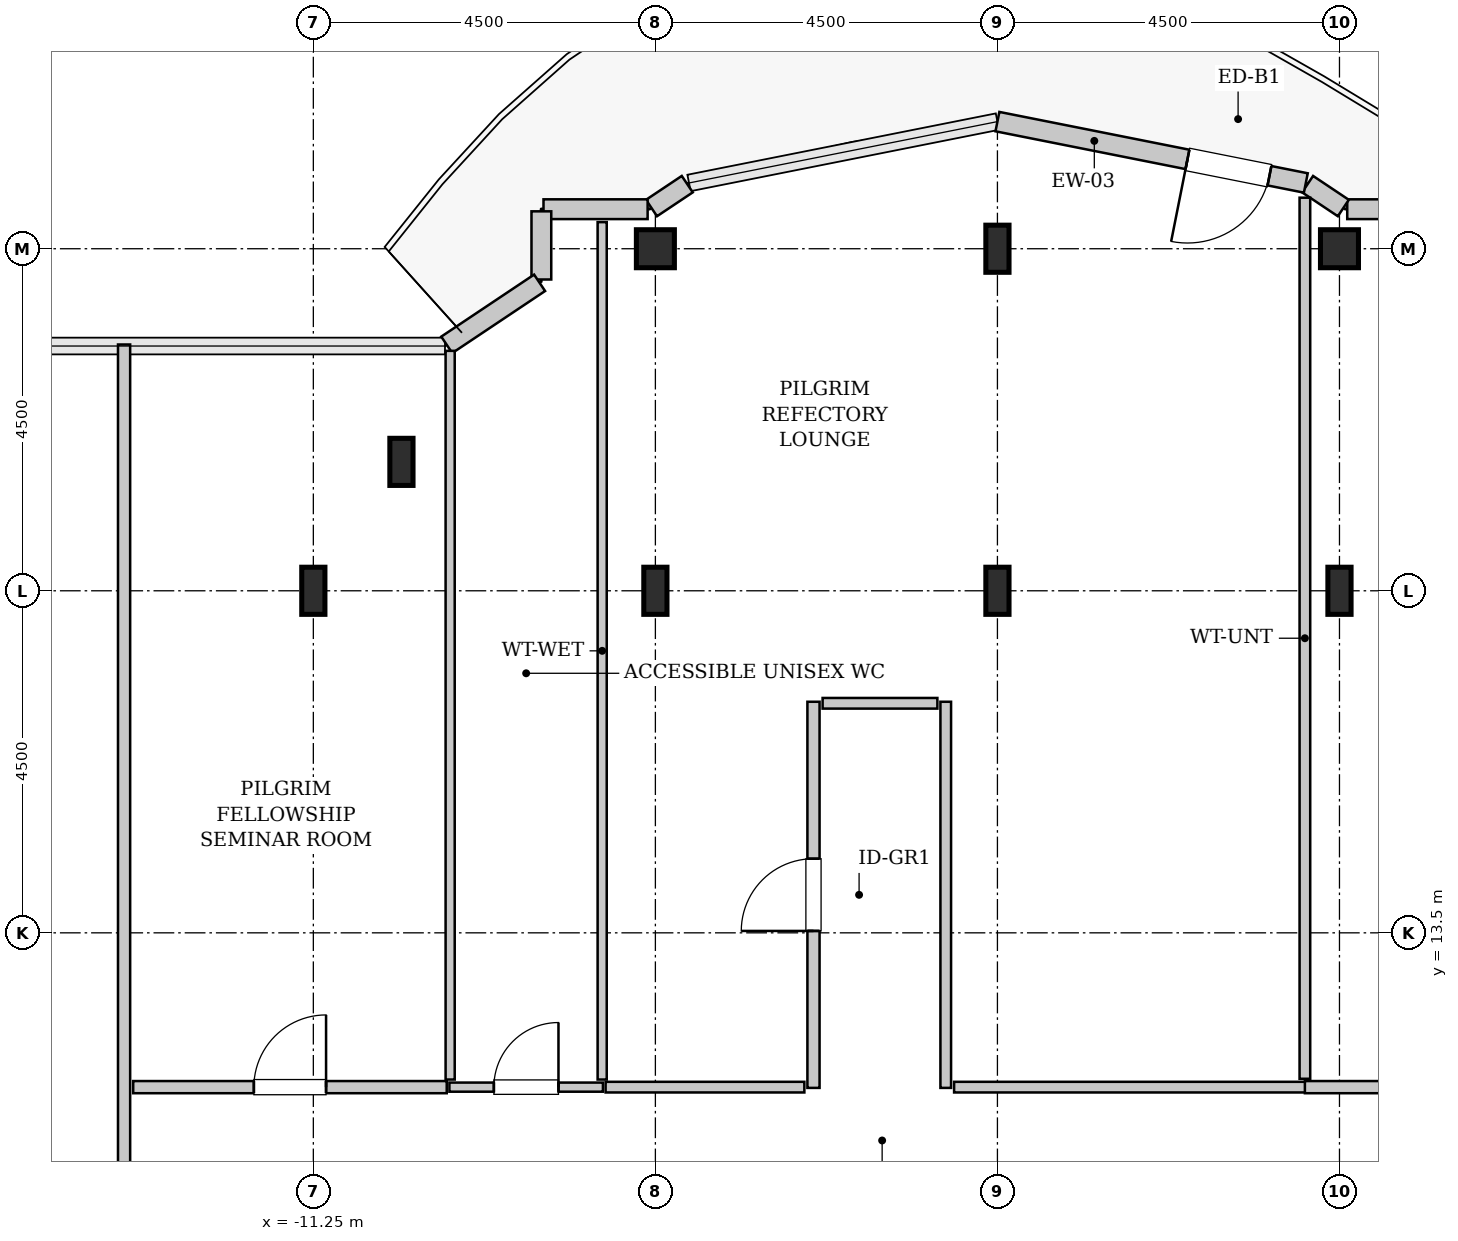
"""IFC4 building model, lengths in metres.
Left out: names, types, materials, properties, quantities, classifications, styles, units other than length and angle.
Written with IfcOpenShell. Run it as: python <this file> out.ifc"""

import sys

from ifc_helpers import new_model, si_unit, direction, frame, frame_2d, origin, origin_2d, place, context, subcontext, project, spatial, rectangle, hollow_rectangle, i_section, extrude, source, transform, mapped, element, fill, save


model = new_model("IFC4")
c1 = context("Model", 3, precision=1e-05, world=origin(), true_north=direction((0.0, 1.0)))
c2 = subcontext(c1, "Body", "Model", "MODEL_VIEW")
j1 = project(units=[si_unit("LENGTHUNIT", "METRE"), si_unit("PLANEANGLEUNIT", "RADIAN")], contexts=[c1])
p1 = place(None, origin())
s1 = spatial("IfcSite", under=j1, at=p1, CompositionType="ELEMENT")
p2 = place(p1, origin())
s2 = spatial("IfcBuilding", under=s1, at=p2, CompositionType="ELEMENT")
p3 = place(p2, frame((0.0, 0.0, 322.4)))
s3 = spatial("IfcBuildingStorey", under=s2, at=p3, CompositionType="ELEMENT", Elevation=322.4)
m1 = source(origin(), c2, "Body", "SweptSolid", [
    extrude(i_section(OverallWidth=0.305, OverallDepth=0.62, WebThickness=0.021, FlangeThickness=0.04, FilletRadius=0.027, at=origin_2d()), origin(), (0.0, 0.0, 1.0), 3.8),
])
for number, where, z_axis, x_axis in (
    (1, (-11.25, 18.0, 0.0), (0.0, 0.0, 1.0), (1.0, 0.0, 0.0)),
    (2, (-10.091, 19.696, 0.0), (0.0, 0.0, 1.0), (1.0, 0.0, 0.0)),
    (3, (-6.75, 18.0, 0.0), (0.0, 0.0, 1.0), (1.0, 0.0, 0.0)),
):
    element("IfcColumn", number, at=place(p3, frame(where, z_axis=z_axis, x_axis=x_axis)), inside=s3, PredefinedType="COLUMN", context=c2, shape_type="MappedRepresentation", body=[
        mapped(m1, transform((0.0, 0.0, 0.0), x_axis=(1.0, 0.0, 0.0), y_axis=(0.0, 1.0, 0.0), z_axis=(0.0, 0.0, 1.0), scale=1.0)),
    ])
m2 = source(origin(), c2, "Body", "SweptSolid", [
    extrude(hollow_rectangle(XDim=0.5, YDim=0.5, WallThickness=0.025, InnerFilletRadius=0.025, OuterFilletRadius=0.05, at=origin_2d()), origin(), (0.0, 0.0, 1.0), 3.8),
])
p4 = place(p3, frame((-6.75, 22.5, 0.0), z_axis=(0.0, 0.0, 1.0), x_axis=(1.0, 0.0, 0.0)))
e4 = element("IfcColumn", 4, at=p4, inside=s3, PredefinedType="COLUMN", context=c2, shape_type="MappedRepresentation", body=[
    mapped(m2, transform((0.0, 0.0, 0.0), x_axis=(1.0, 0.0, 0.0), y_axis=(0.0, 1.0, 0.0), z_axis=(0.0, 0.0, 1.0), scale=1.0)),
])
for number, where, z_axis, x_axis in (
    (5, (-2.25, 18.0, 0.0), (0.0, 0.0, 1.0), (1.0, 0.0, 0.0)),
    (6, (-2.25, 22.5, 0.0), (0.0, 0.0, 1.0), (1.0, 0.0, 0.0)),
    (7, (2.25, 18.0, 0.0), (0.0, 0.0, 1.0), (1.0, 0.0, 0.0)),
):
    element("IfcColumn", number, at=place(p3, frame(where, z_axis=z_axis, x_axis=x_axis)), inside=s3, PredefinedType="COLUMN", context=c2, shape_type="MappedRepresentation", body=[
        mapped(m1, transform((0.0, 0.0, 0.0), x_axis=(1.0, 0.0, 0.0), y_axis=(0.0, 1.0, 0.0), z_axis=(0.0, 0.0, 1.0), scale=1.0)),
    ])
p5 = place(p3, frame((2.25, 22.5, 0.0), z_axis=(0.0, 0.0, 1.0), x_axis=(1.0, 0.0, 0.0)))
e8 = element("IfcColumn", 8, at=p5, inside=s3, PredefinedType="COLUMN", context=c2, shape_type="MappedRepresentation", body=[
    mapped(m2, transform((0.0, 0.0, 0.0), x_axis=(1.0, 0.0, 0.0), y_axis=(0.0, 1.0, 0.0), z_axis=(0.0, 0.0, 1.0), scale=1.0)),
])
m3 = source(origin(), c2, "Body", "SweptSolid", [
    extrude(rectangle(XDim=1.37, YDim=0.26, at=frame_2d((0.685, 0.0))), origin(), (0.0, 0.0, 1.0), 3.55),
])
p6 = place(p3, frame((3.722, 23.02, 0.0), z_axis=(0.0, 0.0, 1.0), x_axis=(-1.0, 0.0, 0.0)))
e9 = element("IfcWall", 9, at=p6, inside=s3, PredefinedType="SOLIDWALL", context=c2, shape_type="MappedRepresentation", body=[
    mapped(m3, transform((0.0, 0.0, 0.0), x_axis=(1.0, 0.0, 0.0), y_axis=(0.0, 1.0, 0.0), z_axis=(0.0, 0.0, 1.0), scale=1.0)),
])
m4 = source(origin(), c2, "Body", "SweptSolid", [
    extrude(rectangle(XDim=0.565, YDim=0.26, at=frame_2d((0.283, 0.0))), origin(), (0.0, 0.0, 1.0), 3.55),
])
p7 = place(p3, frame((2.301, 23.036, 0.0), z_axis=(0.0, 0.0, 1.0), x_axis=(-0.831651492666, 0.555297933317, 0.0)))
e10 = element("IfcWall", 10, at=p7, inside=s3, PredefinedType="SOLIDWALL", context=c2, shape_type="MappedRepresentation", body=[
    mapped(m4, transform((0.0, 0.0, 0.0), x_axis=(1.0, 0.0, 0.0), y_axis=(0.0, 1.0, 0.0), z_axis=(0.0, 0.0, 1.0), scale=1.0)),
])
m5 = source(origin(), c2, "Body", "SweptSolid", [
    extrude(rectangle(XDim=4.137, YDim=0.26, at=frame_2d((2.068, 0.0))), origin(), (0.0, 0.0, 1.0), 3.55),
])
p8 = place(p3, frame((1.807, 23.365, 0.0), z_axis=(0.0, 0.0, 1.0), x_axis=(-0.980782170794, 0.195105954428, 0.0)))
e11 = element("IfcWall", 11, at=p8, inside=s3, PredefinedType="SOLIDWALL", context=c2, shape_type="MappedRepresentation", body=[
    mapped(m5, transform((0.0, 0.0, 0.0), x_axis=(1.0, 0.0, 0.0), y_axis=(0.0, 1.0, 0.0), z_axis=(0.0, 0.0, 1.0), scale=1.0)),
])
p9 = place(p8, frame((0.488, 0.0, 0.0)))
e12 = element("IfcOpeningElement", 12, at=p9, cuts=e11, PredefinedType="OPENING", context=c2, shape_type="SweptSolid", body=[
    extrude(rectangle(XDim=1.1, YDim=2.2, at=frame_2d((0.55, 1.1))), frame((0.0, 0.14, 0.0), z_axis=(0.0, -1.0, 0.0), x_axis=(1.0, 0.0, 0.0)), (0.0, 0.0, 1.0), 0.28),
])
p10 = place(p3, frame((-6.331, 23.35, 0.0), z_axis=(0.0, 0.0, 1.0), x_axis=(-0.831651492666, -0.555297933317, 0.0)))
e13 = element("IfcWall", 13, at=p10, inside=s3, PredefinedType="SOLIDWALL", context=c2, shape_type="MappedRepresentation", body=[
    mapped(m4, transform((0.0, 0.0, 0.0), x_axis=(1.0, 0.0, 0.0), y_axis=(0.0, 1.0, 0.0), z_axis=(0.0, 0.0, 1.0), scale=1.0)),
])
p11 = place(p3, frame((-6.852, 23.02, 0.0), z_axis=(0.0, 0.0, 1.0), x_axis=(-1.0, 0.0, 0.0)))
e14 = element("IfcWall", 14, at=p11, inside=s3, PredefinedType="SOLIDWALL", context=c2, shape_type="MappedRepresentation", body=[
    mapped(m3, transform((0.0, 0.0, 0.0), x_axis=(1.0, 0.0, 0.0), y_axis=(0.0, 1.0, 0.0), z_axis=(0.0, 0.0, 1.0), scale=1.0)),
])
m6 = source(origin(), c2, "Body", "SweptSolid", [
    extrude(rectangle(XDim=0.897, YDim=0.26, at=frame_2d((0.448, 0.0))), origin(), (0.0, 0.0, 1.0), 3.55),
])
p12 = place(p3, frame((-8.25, 22.992, 0.0), z_axis=(0.0, 0.0, 1.0), x_axis=(0.0, -1.0, 0.0)))
e15 = element("IfcWall", 15, at=p12, inside=s3, PredefinedType="SOLIDWALL", context=c2, shape_type="MappedRepresentation", body=[
    mapped(m6, transform((0.0, 0.0, 0.0), x_axis=(1.0, 0.0, 0.0), y_axis=(0.0, 1.0, 0.0), z_axis=(0.0, 0.0, 1.0), scale=1.0)),
])
m7 = source(origin(), c2, "Body", "SweptSolid", [
    extrude(rectangle(XDim=1.469, YDim=0.26, at=frame_2d((0.734, 0.0))), origin(), (0.0, 0.0, 1.0), 3.55),
])
p13 = place(p3, frame((-8.273, 22.052, 0.0), z_axis=(0.0, 0.0, 1.0), x_axis=(-0.831461760506, -0.555581983884, 0.0)))
e16 = element("IfcWall", 16, at=p13, inside=s3, PredefinedType="SOLIDWALL", context=c2, shape_type="MappedRepresentation", body=[
    mapped(m7, transform((0.0, 0.0, 0.0), x_axis=(1.0, 0.0, 0.0), y_axis=(0.0, 1.0, 0.0), z_axis=(0.0, 0.0, 1.0), scale=1.0)),
])
m8 = source(origin(), c2, "Body", "SweptSolid", [
    extrude(rectangle(XDim=2.02, YDim=0.12, at=frame_2d((1.01, 0.0))), origin(), (0.0, 0.0, 1.0), 3.535),
])
p14 = place(p3, frame((-9.46, 11.47, 0.0), z_axis=(0.0, 0.0, 1.0), x_axis=(1.0, 0.0, 0.0)))
e17 = element("IfcWall", 17, at=p14, inside=s3, PredefinedType="PLUMBINGWALL", context=c2, shape_type="MappedRepresentation", body=[
    mapped(m8, transform((0.0, 0.0, 0.0), x_axis=(1.0, 0.0, 0.0), y_axis=(0.0, 1.0, 0.0), z_axis=(0.0, 0.0, 1.0), scale=1.0)),
])
p15 = place(p14, frame((0.585, 0.0, 0.0)))
e18 = element("IfcOpeningElement", 18, at=p15, cuts=e17, PredefinedType="OPENING", context=c2, shape_type="SweptSolid", body=[
    extrude(rectangle(XDim=0.85, YDim=2.1, at=frame_2d((0.425, 1.05))), frame((0.0, 0.07, 0.0), z_axis=(0.0, -1.0, 0.0), x_axis=(1.0, 0.0, 0.0)), (0.0, 0.0, 1.0), 0.14),
])
m9 = source(origin(), c2, "Body", "SweptSolid", [
    extrude(rectangle(XDim=11.28, YDim=0.12, at=frame_2d((5.64, 0.0))), origin(), (0.0, 0.0, 1.0), 3.535),
])
p16 = place(p3, frame((-7.45, 11.57, 0.0), z_axis=(0.0, 0.0, 1.0), x_axis=(0.0, 1.0, 0.0)))
e19 = element("IfcWall", 19, at=p16, inside=s3, PredefinedType="PLUMBINGWALL", context=c2, shape_type="MappedRepresentation", body=[
    mapped(m9, transform((0.0, 0.0, 0.0), x_axis=(1.0, 0.0, 0.0), y_axis=(0.0, 1.0, 0.0), z_axis=(0.0, 0.0, 1.0), scale=1.0)),
])
m10 = source(origin(), c2, "Body", "SweptSolid", [
    extrude(rectangle(XDim=9.587, YDim=0.12, at=frame_2d((4.793, 0.0))), origin(), (0.0, 0.0, 1.0), 3.535),
])
p17 = place(p3, frame((-9.45, 11.57, 0.0), z_axis=(0.0, 0.0, 1.0), x_axis=(0.0, 1.0, 0.0)))
e20 = element("IfcWall", 20, at=p17, inside=s3, PredefinedType="PLUMBINGWALL", context=c2, shape_type="MappedRepresentation", body=[
    mapped(m10, transform((0.0, 0.0, 0.0), x_axis=(1.0, 0.0, 0.0), y_axis=(0.0, 1.0, 0.0), z_axis=(0.0, 0.0, 1.0), scale=1.0)),
])
m11 = source(origin(), c2, "Body", "SweptSolid", [
    extrude(rectangle(XDim=15.045, YDim=0.16, at=frame_2d((7.522, 0.0))), origin(), (0.0, 0.0, 1.0), 3.535),
])
p18 = place(p3, frame((-13.74, 6.195, 0.0), z_axis=(0.0, 0.0, 1.0), x_axis=(0.0, 1.0, 0.0)))
e21 = element("IfcWall", 21, at=p18, inside=s3, PredefinedType="PARTITIONING", context=c2, shape_type="MappedRepresentation", body=[
    mapped(m11, transform((0.0, 0.0, 0.0), x_axis=(1.0, 0.0, 0.0), y_axis=(0.0, 1.0, 0.0), z_axis=(0.0, 0.0, 1.0), scale=1.0)),
])
p19 = place(p18, frame((2.183, 0.0, 0.0)))
e22 = element("IfcOpeningElement", 22, at=p19, cuts=e21, PredefinedType="OPENING", context=c2, shape_type="SweptSolid", body=[
    extrude(rectangle(XDim=0.95, YDim=2.1, at=frame_2d((0.475, 1.05))), frame((0.0, 0.09, 0.0), z_axis=(0.0, -1.0, 0.0), x_axis=(1.0, 0.0, 0.0)), (0.0, 0.0, 1.0), 0.18),
])
m12 = source(origin(), c2, "Body", "SweptSolid", [
    extrude(rectangle(XDim=4.125, YDim=0.16, at=frame_2d((2.062, 0.0))), origin(), (0.0, 0.0, 1.0), 3.535),
])
p20 = place(p3, frame((-13.62, 11.47, 0.0), z_axis=(0.0, 0.0, 1.0), x_axis=(1.0, 0.0, 0.0)))
e23 = element("IfcWall", 23, at=p20, inside=s3, PredefinedType="PARTITIONING", context=c2, shape_type="MappedRepresentation", body=[
    mapped(m12, transform((0.0, 0.0, 0.0), x_axis=(1.0, 0.0, 0.0), y_axis=(0.0, 1.0, 0.0), z_axis=(0.0, 0.0, 1.0), scale=1.0)),
])
p21 = place(p20, frame((1.587, 0.0, 0.0)))
e24 = element("IfcOpeningElement", 24, at=p21, cuts=e23, PredefinedType="OPENING", context=c2, shape_type="SweptSolid", body=[
    extrude(rectangle(XDim=0.95, YDim=2.1, at=frame_2d((0.475, 1.05))), frame((0.0, 0.09, 0.0), z_axis=(0.0, -1.0, 0.0), x_axis=(1.0, 0.0, 0.0)), (0.0, 0.0, 1.0), 0.18),
])
m13 = source(origin(), c2, "Body", "SweptSolid", [
    extrude(rectangle(XDim=5.08, YDim=0.16, at=frame_2d((2.54, 0.0))), origin(), (0.0, 0.0, 1.0), 3.535),
])
p22 = place(p3, frame((-4.67, 11.46, 0.0), z_axis=(0.0, 0.0, 1.0), x_axis=(0.0, 1.0, 0.0)))
e25 = element("IfcWall", 25, at=p22, inside=s3, PredefinedType="PARTITIONING", context=c2, shape_type="MappedRepresentation", body=[
    mapped(m13, transform((0.0, 0.0, 0.0), x_axis=(1.0, 0.0, 0.0), y_axis=(0.0, 1.0, 0.0), z_axis=(0.0, 0.0, 1.0), scale=1.0)),
])
p23 = place(p22, frame((2.065, 0.0, 0.0)))
e26 = element("IfcOpeningElement", 26, at=p23, cuts=e25, PredefinedType="OPENING", context=c2, shape_type="SweptSolid", body=[
    extrude(rectangle(XDim=0.95, YDim=2.1, at=frame_2d((0.475, 1.05))), frame((0.0, 0.09, 0.0), z_axis=(0.0, -1.0, 0.0), x_axis=(1.0, 0.0, 0.0)), (0.0, 0.0, 1.0), 0.18),
])
m14 = source(origin(), c2, "Body", "SweptSolid", [
    extrude(rectangle(XDim=5.08, YDim=0.14, at=frame_2d((2.54, 0.0))), origin(), (0.0, 0.0, 1.0), 3.535),
])
p24 = place(p3, frame((-2.93, 11.46, 0.0), z_axis=(0.0, 0.0, 1.0), x_axis=(0.0, 1.0, 0.0)))
e27 = element("IfcWall", 27, at=p24, inside=s3, PredefinedType="PARTITIONING", context=c2, shape_type="MappedRepresentation", body=[
    mapped(m14, transform((0.0, 0.0, 0.0), x_axis=(1.0, 0.0, 0.0), y_axis=(0.0, 1.0, 0.0), z_axis=(0.0, 0.0, 1.0), scale=1.0)),
])
m15 = source(origin(), c2, "Body", "SweptSolid", [
    extrude(rectangle(XDim=4.625, YDim=0.14, at=frame_2d((2.312, 0.0))), origin(), (0.0, 0.0, 1.0), 3.535),
])
p25 = place(p3, frame((-2.82, 11.47, 0.0), z_axis=(0.0, 0.0, 1.0), x_axis=(1.0, 0.0, 0.0)))
e28 = element("IfcWall", 28, at=p25, inside=s3, PredefinedType="PARTITIONING", context=c2, shape_type="MappedRepresentation", body=[
    mapped(m15, transform((0.0, 0.0, 0.0), x_axis=(1.0, 0.0, 0.0), y_axis=(0.0, 1.0, 0.0), z_axis=(0.0, 0.0, 1.0), scale=1.0)),
])
m16 = source(origin(), c2, "Body", "SweptSolid", [
    extrude(rectangle(XDim=2.615, YDim=0.14, at=frame_2d((1.308, 0.0))), origin(), (0.0, 0.0, 1.0), 3.535),
])
p26 = place(p3, frame((-7.405, 11.47, 0.0), z_axis=(0.0, 0.0, 1.0), x_axis=(1.0, 0.0, 0.0)))
e29 = element("IfcWall", 29, at=p26, inside=s3, PredefinedType="PARTITIONING", context=c2, shape_type="MappedRepresentation", body=[
    mapped(m16, transform((0.0, 0.0, 0.0), x_axis=(1.0, 0.0, 0.0), y_axis=(0.0, 1.0, 0.0), z_axis=(0.0, 0.0, 1.0), scale=1.0)),
])
m17 = source(origin(), c2, "Body", "SweptSolid", [
    extrude(rectangle(XDim=1.51, YDim=0.14, at=frame_2d((0.755, 0.0))), origin(), (0.0, 0.0, 1.0), 3.535),
])
p27 = place(p3, frame((-4.55, 16.52, 0.0), z_axis=(0.0, 0.0, 1.0), x_axis=(1.0, 0.0, 0.0)))
e30 = element("IfcWall", 30, at=p27, inside=s3, PredefinedType="PARTITIONING", context=c2, shape_type="MappedRepresentation", body=[
    mapped(m17, transform((0.0, 0.0, 0.0), x_axis=(1.0, 0.0, 0.0), y_axis=(0.0, 1.0, 0.0), z_axis=(0.0, 0.0, 1.0), scale=1.0)),
])
m18 = source(origin(), c2, "Body", "SweptSolid", [
    extrude(rectangle(XDim=11.591, YDim=0.14, at=frame_2d((5.796, 0.0))), origin(), (0.0, 0.0, 1.0), 2.975),
])
p28 = place(p3, frame((1.795, 11.58, 0.0), z_axis=(0.0, 0.0, 1.0), x_axis=(0.0, 1.0, 0.0)))
e31 = element("IfcWall", 31, at=p28, inside=s3, PredefinedType="PARTITIONING", context=c2, shape_type="MappedRepresentation", body=[
    mapped(m18, transform((0.0, 0.0, 0.0), x_axis=(1.0, 0.0, 0.0), y_axis=(0.0, 1.0, 0.0), z_axis=(0.0, 0.0, 1.0), scale=1.0)),
])
m19 = source(origin(), c2, "Body", "SweptSolid", [
    extrude(rectangle(XDim=5.965, YDim=0.16, at=frame_2d((2.982, 0.0))), origin(), (0.0, 0.0, 1.0), 3.535),
])
p29 = place(p3, frame((1.795, 11.47, 0.0), z_axis=(0.0, 0.0, 1.0), x_axis=(1.0, 0.0, 0.0)))
e32 = element("IfcWall", 32, at=p29, inside=s3, PredefinedType="PARTITIONING", context=c2, shape_type="MappedRepresentation", body=[
    mapped(m19, transform((0.0, 0.0, 0.0), x_axis=(1.0, 0.0, 0.0), y_axis=(0.0, 1.0, 0.0), z_axis=(0.0, 0.0, 1.0), scale=1.0)),
])
p30 = place(p29, frame((2.508, 0.0, 0.0)))
e33 = element("IfcOpeningElement", 33, at=p30, cuts=e32, PredefinedType="OPENING", context=c2, shape_type="SweptSolid", body=[
    extrude(rectangle(XDim=0.95, YDim=2.1, at=frame_2d((0.475, 1.05))), frame((0.0, 0.09, 0.0), z_axis=(0.0, -1.0, 0.0), x_axis=(1.0, 0.0, 0.0)), (0.0, 0.0, 1.0), 0.18),
])
m20 = source(origin(), c2, "Body", "SweptSolid", [
    extrude(rectangle(XDim=1.1, YDim=2.2, at=frame_2d((0.55, 1.1))), frame((0.0, 0.025, 0.0), z_axis=(0.0, -1.0, 0.0), x_axis=(1.0, 0.0, 0.0)), (0.0, 0.0, 1.0), 0.05),
])
p31 = place(p9, origin())
e34 = element("IfcDoor", 34, at=p31, inside=s3, OperationType="SINGLE_SWING_RIGHT", PredefinedType="DOOR", context=c2, shape_type="MappedRepresentation", body=[
    mapped(m20, transform((0.0, 0.0, 0.0), x_axis=(1.0, 0.0, 0.0), y_axis=(0.0, 1.0, 0.0), z_axis=(0.0, 0.0, 1.0), scale=1.0)),
])
fill(e12, e34)
m21 = source(origin(), c2, "Body", "SweptSolid", [
    extrude(rectangle(XDim=0.85, YDim=2.1, at=frame_2d((0.425, 1.05))), frame((0.0, 0.025, 0.0), z_axis=(0.0, -1.0, 0.0), x_axis=(1.0, 0.0, 0.0)), (0.0, 0.0, 1.0), 0.05),
])
p32 = place(p15, origin())
e35 = element("IfcDoor", 35, at=p32, inside=s3, OperationType="SINGLE_SWING_RIGHT", PredefinedType="DOOR", context=c2, shape_type="MappedRepresentation", body=[
    mapped(m21, transform((0.0, 0.0, 0.0), x_axis=(1.0, 0.0, 0.0), y_axis=(0.0, 1.0, 0.0), z_axis=(0.0, 0.0, 1.0), scale=1.0)),
])
fill(e18, e35)
m22 = source(origin(), c2, "Body", "SweptSolid", [
    extrude(rectangle(XDim=0.95, YDim=2.1, at=frame_2d((0.475, 1.05))), frame((0.0, 0.025, 0.0), z_axis=(0.0, -1.0, 0.0), x_axis=(1.0, 0.0, 0.0)), (0.0, 0.0, 1.0), 0.05),
])
p33 = place(p21, origin())
e36 = element("IfcDoor", 36, at=p33, inside=s3, OperationType="SINGLE_SWING_RIGHT", PredefinedType="DOOR", context=c2, shape_type="MappedRepresentation", body=[
    mapped(m22, transform((0.0, 0.0, 0.0), x_axis=(1.0, 0.0, 0.0), y_axis=(0.0, 1.0, 0.0), z_axis=(0.0, 0.0, 1.0), scale=1.0)),
])
fill(e24, e36)
p34 = place(p23, origin())
e37 = element("IfcDoor", 37, at=p34, inside=s3, OperationType="SINGLE_SWING_LEFT", PredefinedType="DOOR", context=c2, shape_type="MappedRepresentation", body=[
    mapped(m22, transform((0.0, 0.0, 0.0), x_axis=(1.0, 0.0, 0.0), y_axis=(0.0, 1.0, 0.0), z_axis=(0.0, 0.0, 1.0), scale=1.0)),
])
fill(e26, e37)
save(model, sys.argv[1])
